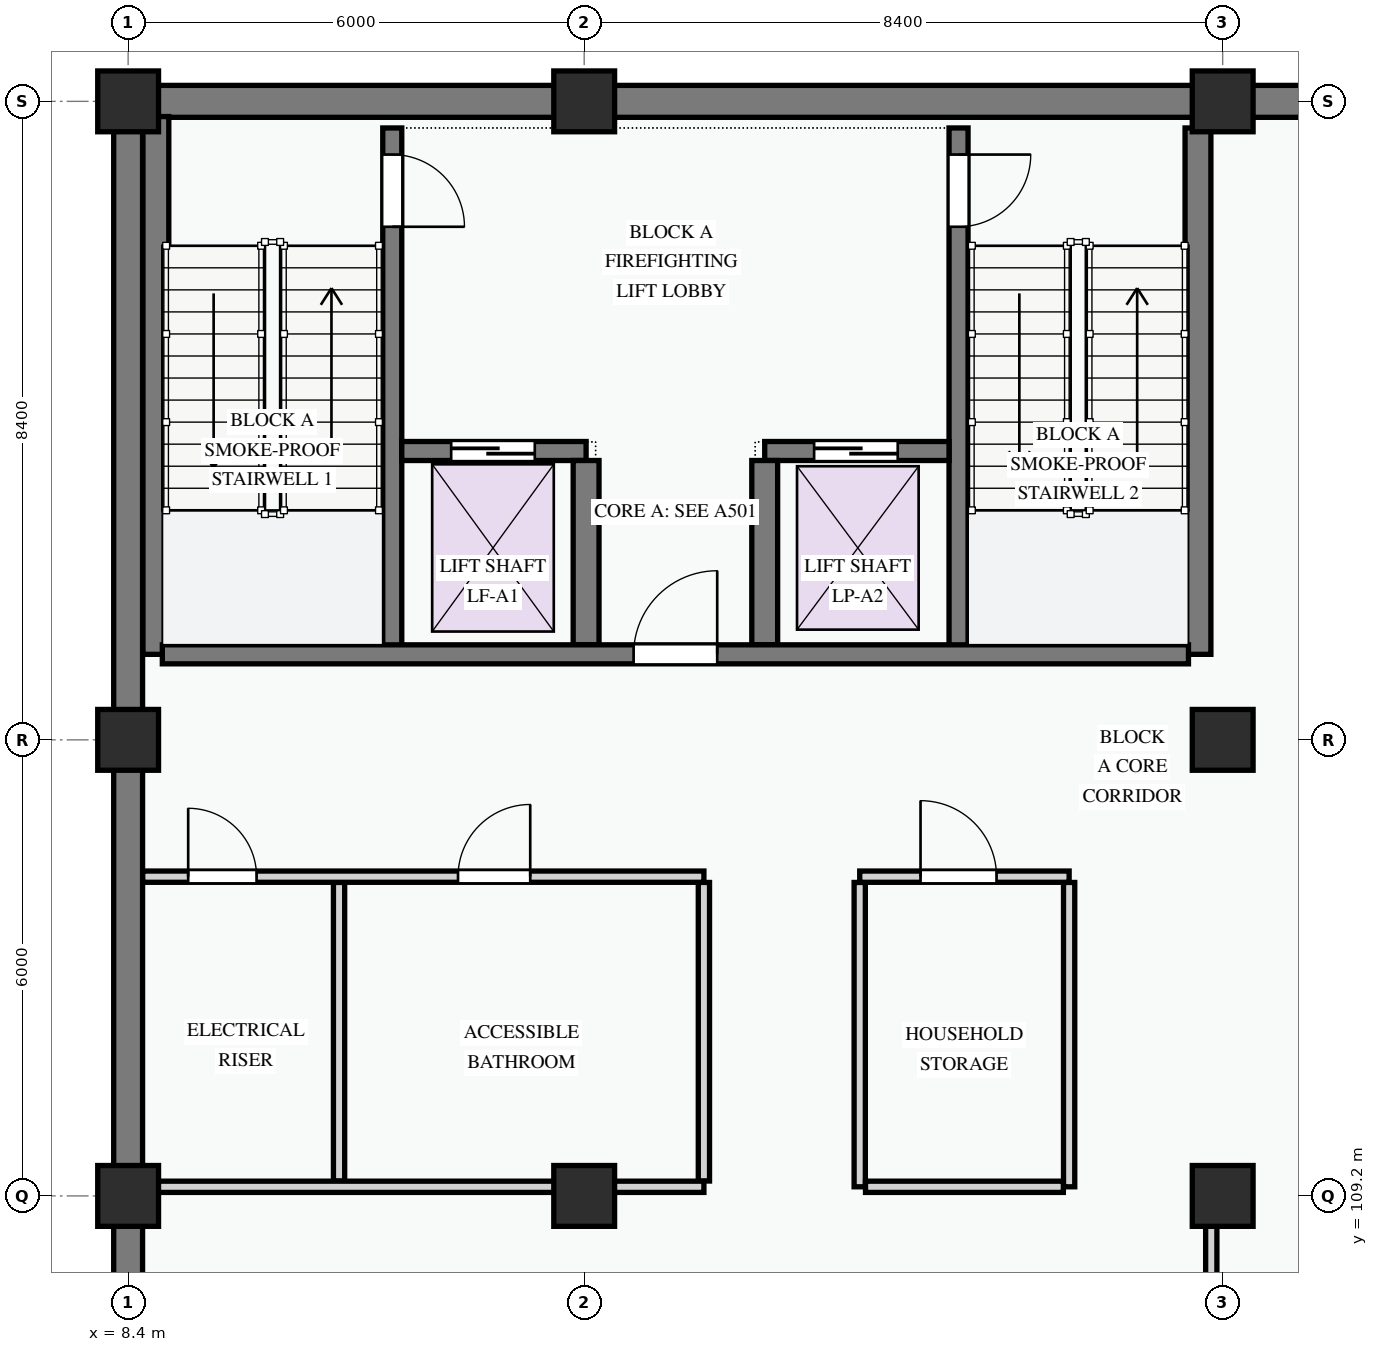
"""IFC4 building model, lengths in metres.
Left out: names, types, materials, properties, quantities, classifications, styles, units other than length and angle.
Written with IfcOpenShell. Run it as: python <this file> out.ifc"""

import sys

from ifc_helpers import new_model, si_unit, direction, frame, frame_2d, origin, origin_2d, place, context, subcontext, project, spatial, rectangle, extrude, element, fill, save


model = new_model("IFC4")
c1 = context("Model", 3, precision=1e-05, world=origin(), true_north=direction((0.0, 1.0)))
c2 = subcontext(c1, "Body", "Model", "MODEL_VIEW")
j1 = project(units=[si_unit("LENGTHUNIT", "METRE"), si_unit("PLANEANGLEUNIT", "RADIAN")], contexts=[c1])
p1 = place(None, origin())
s1 = spatial("IfcSite", under=j1, at=p1, CompositionType="ELEMENT")
p2 = place(p1, origin())
s2 = spatial("IfcBuilding", under=s1, at=p2, CompositionType="ELEMENT")
p3 = place(p2, frame((0.0, 0.0, -4.2)))
s3 = spatial("IfcBuildingStorey", under=s2, at=p3, CompositionType="ELEMENT", Elevation=-4.2)
for number, where, z_axis, x_axis in (
    (1, (8.4, 109.2, -0.45), (0.0, 0.0, 1.0), (1.0, 0.0, 0.0)),
    (2, (8.4, 115.2, -0.45), (0.0, 0.0, 1.0), (1.0, 0.0, 0.0)),
    (3, (8.4, 123.6, -0.45), (0.0, 0.0, 1.0), (1.0, 0.0, 0.0)),
    (4, (14.4, 109.2, -0.45), (0.0, 0.0, 1.0), (1.0, 0.0, 0.0)),
    (5, (14.4, 123.6, -0.45), (0.0, 0.0, 1.0), (1.0, 0.0, 0.0)),
    (6, (22.8, 109.2, -0.45), (0.0, 0.0, 1.0), (1.0, 0.0, 0.0)),
    (7, (22.8, 115.2, -0.45), (0.0, 0.0, 1.0), (1.0, 0.0, 0.0)),
    (8, (22.8, 123.6, -0.45), (0.0, 0.0, 1.0), (1.0, 0.0, 0.0)),
):
    element("IfcColumn", number, at=place(p3, frame(where, z_axis=z_axis, x_axis=x_axis)), inside=s3, PredefinedType="COLUMN", context=c2, shape_type="SweptSolid", body=[
        extrude(rectangle(XDim=0.8, YDim=0.8, at=origin_2d()), origin(), (0.0, 0.0, 1.0), 4.65),
    ])
p4 = place(p3, frame((66.0, 123.6, 0.0), z_axis=(0.0, 0.0, 1.0), x_axis=(-1.0, 0.0, 0.0)))
e9 = element("IfcWall", 9, at=p4, inside=s3, PredefinedType="SHEAR", context=c2, shape_type="SweptSolid", body=[
    extrude(rectangle(XDim=57.6, YDim=0.42, at=frame_2d((28.8, 0.0))), origin(), (0.0, 0.0, 1.0), 3.9),
])
p5 = place(p3, frame((8.4, 123.6, 0.0), z_axis=(0.0, 0.0, 1.0), x_axis=(0.0, -1.0, 0.0)))
e10 = element("IfcWall", 10, at=p5, inside=s3, PredefinedType="SHEAR", context=c2, shape_type="SweptSolid", body=[
    extrude(rectangle(XDim=115.2, YDim=0.38, at=frame_2d((57.6, 0.0))), origin(), (0.0, 0.0, 1.0), 3.9),
])
p6 = place(p3, frame((11.875, 123.25, 0.0), z_axis=(0.0, 0.0, 1.0), x_axis=(0.0, -1.0, 0.0)))
e11 = element("IfcWall", 11, at=p6, inside=s3, PredefinedType="SHEAR", context=c2, shape_type="SweptSolid", body=[
    extrude(rectangle(XDim=6.925, YDim=0.25, at=frame_2d((3.462, 0.0))), origin(), (0.0, 0.0, 1.0), 3.9),
])
p7 = place(p6, frame((0.35, 0.0, 0.0)))
e12 = element("IfcOpeningElement", 12, at=p7, cuts=e11, PredefinedType="OPENING", context=c2, shape_type="SweptSolid", body=[
    extrude(rectangle(XDim=0.95, YDim=2.1, at=frame_2d((0.475, 1.05))), frame((0.0, 0.135, 0.0), z_axis=(0.0, -1.0, 0.0), x_axis=(1.0, 0.0, 0.0)), (0.0, 0.0, 1.0), 0.27),
])
p8 = place(p3, frame((8.765, 123.4, 0.0), z_axis=(0.0, 0.0, 1.0), x_axis=(0.0, -1.0, 0.0)))
e13 = element("IfcWall", 13, at=p8, inside=s3, PredefinedType="SHEAR", context=c2, shape_type="SweptSolid", body=[
    extrude(rectangle(XDim=7.075, YDim=0.34, at=frame_2d((3.538, 0.0))), origin(), (0.0, 0.0, 1.0), 3.9),
])
p9 = place(p3, frame((22.475, 123.25, 0.0), z_axis=(0.0, 0.0, 1.0), x_axis=(0.0, -1.0, 0.0)))
e14 = element("IfcWall", 14, at=p9, inside=s3, PredefinedType="SHEAR", context=c2, shape_type="SweptSolid", body=[
    extrude(rectangle(XDim=6.925, YDim=0.34, at=frame_2d((3.462, 0.0))), origin(), (0.0, 0.0, 1.0), 3.9),
])
p10 = place(p3, frame((19.325, 123.25, 0.0), z_axis=(0.0, 0.0, 1.0), x_axis=(0.0, -1.0, 0.0)))
e15 = element("IfcWall", 15, at=p10, inside=s3, PredefinedType="SHEAR", context=c2, shape_type="SweptSolid", body=[
    extrude(rectangle(XDim=6.925, YDim=0.25, at=frame_2d((3.462, 0.0))), origin(), (0.0, 0.0, 1.0), 3.9),
])
p11 = place(p10, frame((0.35, 0.0, 0.0)))
e16 = element("IfcOpeningElement", 16, at=p11, cuts=e15, PredefinedType="OPENING", context=c2, shape_type="SweptSolid", body=[
    extrude(rectangle(XDim=0.95, YDim=2.1, at=frame_2d((0.475, 1.05))), frame((0.0, 0.135, 0.0), z_axis=(0.0, -1.0, 0.0), x_axis=(1.0, 0.0, 0.0)), (0.0, 0.0, 1.0), 0.27),
])
p12 = place(p3, frame((12.0, 119.0, 0.0), z_axis=(0.0, 0.0, 1.0), x_axis=(1.0, 0.0, 0.0)))
e17 = element("IfcWall", 17, at=p12, inside=s3, PredefinedType="SHEAR", context=c2, shape_type="SweptSolid", body=[
    extrude(rectangle(XDim=2.425, YDim=0.25, at=frame_2d((1.212, 0.0))), origin(), (0.0, 0.0, 1.0), 3.9),
])
p13 = place(p12, frame((0.65, 0.0, 0.0)))
e18 = element("IfcOpeningElement", 18, at=p13, cuts=e17, PredefinedType="OPENING", context=c2, shape_type="SweptSolid", body=[
    extrude(rectangle(XDim=1.1, YDim=2.15, at=frame_2d((0.55, 1.075))), frame((0.0, 0.135, 0.0), z_axis=(0.0, -1.0, 0.0), x_axis=(1.0, 0.0, 0.0)), (0.0, 0.0, 1.0), 0.27),
])
p14 = place(p3, frame((16.775, 119.0, 0.0), z_axis=(0.0, 0.0, 1.0), x_axis=(1.0, 0.0, 0.0)))
e19 = element("IfcWall", 19, at=p14, inside=s3, PredefinedType="SHEAR", context=c2, shape_type="SweptSolid", body=[
    extrude(rectangle(XDim=2.425, YDim=0.25, at=frame_2d((1.212, 0.0))), origin(), (0.0, 0.0, 1.0), 3.9),
])
p15 = place(p14, frame((0.65, 0.0, 0.0)))
e20 = element("IfcOpeningElement", 20, at=p15, cuts=e19, PredefinedType="OPENING", context=c2, shape_type="SweptSolid", body=[
    extrude(rectangle(XDim=1.1, YDim=2.15, at=frame_2d((0.55, 1.075))), frame((0.0, 0.135, 0.0), z_axis=(0.0, -1.0, 0.0), x_axis=(1.0, 0.0, 0.0)), (0.0, 0.0, 1.0), 0.27),
])
for number, where, z_axis, x_axis in (
    (21, (14.425, 118.875, 0.0), (0.0, 0.0, 1.0), (0.0, -1.0, 0.0)),
    (22, (16.775, 118.875, 0.0), (0.0, 0.0, 1.0), (0.0, -1.0, 0.0)),
):
    element("IfcWall", number, at=place(p3, frame(where, z_axis=z_axis, x_axis=x_axis)), inside=s3, PredefinedType="SHEAR", context=c2, shape_type="SweptSolid", body=[
        extrude(rectangle(XDim=2.425, YDim=0.34, at=frame_2d((1.212, 0.0))), origin(), (0.0, 0.0, 1.0), 3.9),
    ])
p16 = place(p3, frame((8.85, 116.325, 0.0), z_axis=(0.0, 0.0, 1.0), x_axis=(1.0, 0.0, 0.0)))
e23 = element("IfcWall", 23, at=p16, inside=s3, PredefinedType="SHEAR", context=c2, shape_type="SweptSolid", body=[
    extrude(rectangle(XDim=13.5, YDim=0.25, at=frame_2d((6.75, 0.0))), origin(), (0.0, 0.0, 1.0), 3.9),
])
p17 = place(p16, frame((6.2, 0.0, 0.0)))
e24 = element("IfcOpeningElement", 24, at=p17, cuts=e23, PredefinedType="OPENING", context=c2, shape_type="SweptSolid", body=[
    extrude(rectangle(XDim=1.1, YDim=2.15, at=frame_2d((0.55, 1.075))), frame((0.0, 0.135, 0.0), z_axis=(0.0, -1.0, 0.0), x_axis=(1.0, 0.0, 0.0)), (0.0, 0.0, 1.0), 0.27),
])
for number, where, z_axis, x_axis in (
    (25, (11.175, 113.324, 0.0), (0.0, 0.0, 1.0), (0.0, -1.0, 0.0)),
    (26, (15.975, 113.324, 0.0), (0.0, 0.0, 1.0), (0.0, -1.0, 0.0)),
):
    element("IfcWall", number, at=place(p3, frame(where, z_axis=z_axis, x_axis=x_axis)), inside=s3, PredefinedType="PARTITIONING", context=c2, shape_type="SweptSolid", body=[
        extrude(rectangle(XDim=3.928, YDim=0.148, at=frame_2d((1.964, 0.0))), origin(), (0.0, 0.0, 1.0), 3.9),
    ])
for number, where, z_axis, x_axis in (
    (27, (18.025, 113.324, 0.0), (0.0, 0.0, 1.0), (0.0, -1.0, 0.0)),
    (28, (20.78, 113.324, 0.0), (0.0, 0.0, 1.0), (0.0, -1.0, 0.0)),
):
    element("IfcWall", number, at=place(p3, frame(where, z_axis=z_axis, x_axis=x_axis)), inside=s3, PredefinedType="PARTITIONING", context=c2, shape_type="SweptSolid", body=[
        extrude(rectangle(XDim=4.004, YDim=0.148, at=frame_2d((2.002, 0.0))), origin(), (0.0, 0.0, 1.0), 3.9),
    ])
p18 = place(p3, frame((8.592, 113.4, 0.0), z_axis=(0.0, 0.0, 1.0), x_axis=(1.0, 0.0, 0.0)))
e29 = element("IfcWall", 29, at=p18, inside=s3, PredefinedType="PARTITIONING", context=c2, shape_type="SweptSolid", body=[
    extrude(rectangle(XDim=7.383, YDim=0.148, at=frame_2d((3.691, 0.0))), origin(), (0.0, 0.0, 1.0), 3.9),
])
p19 = place(p18, frame((0.598, 0.0, 0.0)))
e30 = element("IfcOpeningElement", 30, at=p19, cuts=e29, PredefinedType="OPENING", context=c2, shape_type="SweptSolid", body=[
    extrude(rectangle(XDim=0.9, YDim=2.1, at=frame_2d((0.45, 1.05))), frame((0.0, 0.084, 0.0), z_axis=(0.0, -1.0, 0.0), x_axis=(1.0, 0.0, 0.0)), (0.0, 0.0, 1.0), 0.168),
])
p20 = place(p18, frame((4.148, 0.0, 0.0)))
e31 = element("IfcOpeningElement", 31, at=p20, cuts=e29, PredefinedType="OPENING", context=c2, shape_type="SweptSolid", body=[
    extrude(rectangle(XDim=0.95, YDim=2.1, at=frame_2d((0.475, 1.05))), frame((0.0, 0.084, 0.0), z_axis=(0.0, -1.0, 0.0), x_axis=(1.0, 0.0, 0.0)), (0.0, 0.0, 1.0), 0.168),
])
p21 = place(p3, frame((18.025, 113.4, 0.0), z_axis=(0.0, 0.0, 1.0), x_axis=(1.0, 0.0, 0.0)))
e32 = element("IfcWall", 32, at=p21, inside=s3, PredefinedType="PARTITIONING", context=c2, shape_type="SweptSolid", body=[
    extrude(rectangle(XDim=2.755, YDim=0.148, at=frame_2d((1.377, 0.0))), origin(), (0.0, 0.0, 1.0), 3.9),
])
p22 = place(p21, frame((0.8, 0.0, 0.0)))
e33 = element("IfcOpeningElement", 33, at=p22, cuts=e32, PredefinedType="OPENING", context=c2, shape_type="SweptSolid", body=[
    extrude(rectangle(XDim=1.0, YDim=2.15, at=frame_2d((0.5, 1.075))), frame((0.0, 0.084, 0.0), z_axis=(0.0, -1.0, 0.0), x_axis=(1.0, 0.0, 0.0)), (0.0, 0.0, 1.0), 0.168),
])
p23 = place(p3, frame((8.592, 109.32, 0.0), z_axis=(0.0, 0.0, 1.0), x_axis=(1.0, 0.0, 0.0)))
e34 = element("IfcWall", 34, at=p23, inside=s3, PredefinedType="PARTITIONING", context=c2, shape_type="SweptSolid", body=[
    extrude(rectangle(XDim=7.383, YDim=0.148, at=frame_2d((3.691, 0.0))), origin(), (0.0, 0.0, 1.0), 3.185),
])
p24 = place(p3, frame((18.101, 109.32, 0.0), z_axis=(0.0, 0.0, 1.0), x_axis=(1.0, 0.0, 0.0)))
e35 = element("IfcWall", 35, at=p24, inside=s3, PredefinedType="PARTITIONING", context=c2, shape_type="SweptSolid", body=[
    extrude(rectangle(XDim=2.603, YDim=0.148, at=frame_2d((1.302, 0.0))), origin(), (0.0, 0.0, 1.0), 3.185),
])
p25 = place(p3, frame((22.65, 72.0, 0.0), z_axis=(0.0, 0.0, 1.0), x_axis=(0.0, 1.0, 0.0)))
e36 = element("IfcWall", 36, at=p25, inside=s3, PredefinedType="PARTITIONING", context=c2, shape_type="SweptSolid", body=[
    extrude(rectangle(XDim=37.2, YDim=0.148, at=frame_2d((18.6, 0.0))), origin(), (0.0, 0.0, 1.0), 3.185),
])
p26 = place(p25, frame((16.5, 0.0, 0.0)))
e37 = element("IfcOpeningElement", 37, at=p26, cuts=e36, PredefinedType="OPENING", context=c2, shape_type="SweptSolid", body=[
    extrude(rectangle(XDim=1.0, YDim=2.15, at=frame_2d((0.5, 1.075))), frame((0.0, 0.084, 0.0), z_axis=(0.0, -1.0, 0.0), x_axis=(1.0, 0.0, 0.0)), (0.0, 0.0, 1.0), 0.168),
])
p27 = place(p7, origin())
e38 = element("IfcDoor", 38, at=p27, inside=s3, OperationType="SINGLE_SWING_RIGHT", PredefinedType="DOOR", context=c2, shape_type="SweptSolid", body=[
    extrude(rectangle(XDim=0.95, YDim=2.1, at=frame_2d((0.475, 1.05))), frame((0.0, 0.025, 0.0), z_axis=(0.0, -1.0, 0.0), x_axis=(1.0, 0.0, 0.0)), (0.0, 0.0, 1.0), 0.05),
])
fill(e12, e38)
p28 = place(p11, origin())
e39 = element("IfcDoor", 39, at=p28, inside=s3, OperationType="SINGLE_SWING_LEFT", PredefinedType="DOOR", context=c2, shape_type="SweptSolid", body=[
    extrude(rectangle(XDim=0.95, YDim=2.1, at=frame_2d((0.475, 1.05))), frame((0.0, 0.025, 0.0), z_axis=(0.0, -1.0, 0.0), x_axis=(1.0, 0.0, 0.0)), (0.0, 0.0, 1.0), 0.05),
])
fill(e16, e39)
p29 = place(p13, origin())
e40 = element("IfcDoor", 40, at=p29, inside=s3, OperationType="SLIDING_TO_LEFT", PredefinedType="DOOR", context=c2, shape_type="SweptSolid", body=[
    extrude(rectangle(XDim=1.1, YDim=2.15, at=frame_2d((0.55, 1.075))), frame((0.0, 0.025, 0.0), z_axis=(0.0, -1.0, 0.0), x_axis=(1.0, 0.0, 0.0)), (0.0, 0.0, 1.0), 0.05),
])
fill(e18, e40)
p30 = place(p15, origin())
e41 = element("IfcDoor", 41, at=p30, inside=s3, OperationType="SLIDING_TO_LEFT", PredefinedType="DOOR", context=c2, shape_type="SweptSolid", body=[
    extrude(rectangle(XDim=1.1, YDim=2.15, at=frame_2d((0.55, 1.075))), frame((0.0, 0.025, 0.0), z_axis=(0.0, -1.0, 0.0), x_axis=(1.0, 0.0, 0.0)), (0.0, 0.0, 1.0), 0.05),
])
fill(e20, e41)
p31 = place(p17, origin())
e42 = element("IfcDoor", 42, at=p31, inside=s3, OperationType="SINGLE_SWING_RIGHT", PredefinedType="DOOR", context=c2, shape_type="SweptSolid", body=[
    extrude(rectangle(XDim=1.1, YDim=2.15, at=frame_2d((0.55, 1.075))), frame((0.0, 0.025, 0.0), z_axis=(0.0, -1.0, 0.0), x_axis=(1.0, 0.0, 0.0)), (0.0, 0.0, 1.0), 0.05),
])
fill(e24, e42)
p32 = place(p19, origin())
e43 = element("IfcDoor", 43, at=p32, inside=s3, OperationType="SINGLE_SWING_LEFT", PredefinedType="DOOR", context=c2, shape_type="SweptSolid", body=[
    extrude(rectangle(XDim=0.9, YDim=2.1, at=frame_2d((0.45, 1.05))), frame((0.0, 0.025, 0.0), z_axis=(0.0, -1.0, 0.0), x_axis=(1.0, 0.0, 0.0)), (0.0, 0.0, 1.0), 0.05),
])
fill(e30, e43)
p33 = place(p20, origin())
e44 = element("IfcDoor", 44, at=p33, inside=s3, OperationType="SINGLE_SWING_RIGHT", PredefinedType="DOOR", context=c2, shape_type="SweptSolid", body=[
    extrude(rectangle(XDim=0.95, YDim=2.1, at=frame_2d((0.475, 1.05))), frame((0.0, 0.025, 0.0), z_axis=(0.0, -1.0, 0.0), x_axis=(1.0, 0.0, 0.0)), (0.0, 0.0, 1.0), 0.05),
])
fill(e31, e44)
p34 = place(p22, origin())
e45 = element("IfcDoor", 45, at=p34, inside=s3, OperationType="SINGLE_SWING_LEFT", PredefinedType="DOOR", context=c2, shape_type="SweptSolid", body=[
    extrude(rectangle(XDim=1.0, YDim=2.15, at=frame_2d((0.5, 1.075))), frame((0.0, 0.025, 0.0), z_axis=(0.0, -1.0, 0.0), x_axis=(1.0, 0.0, 0.0)), (0.0, 0.0, 1.0), 0.05),
])
fill(e33, e45)
save(model, sys.argv[1])
